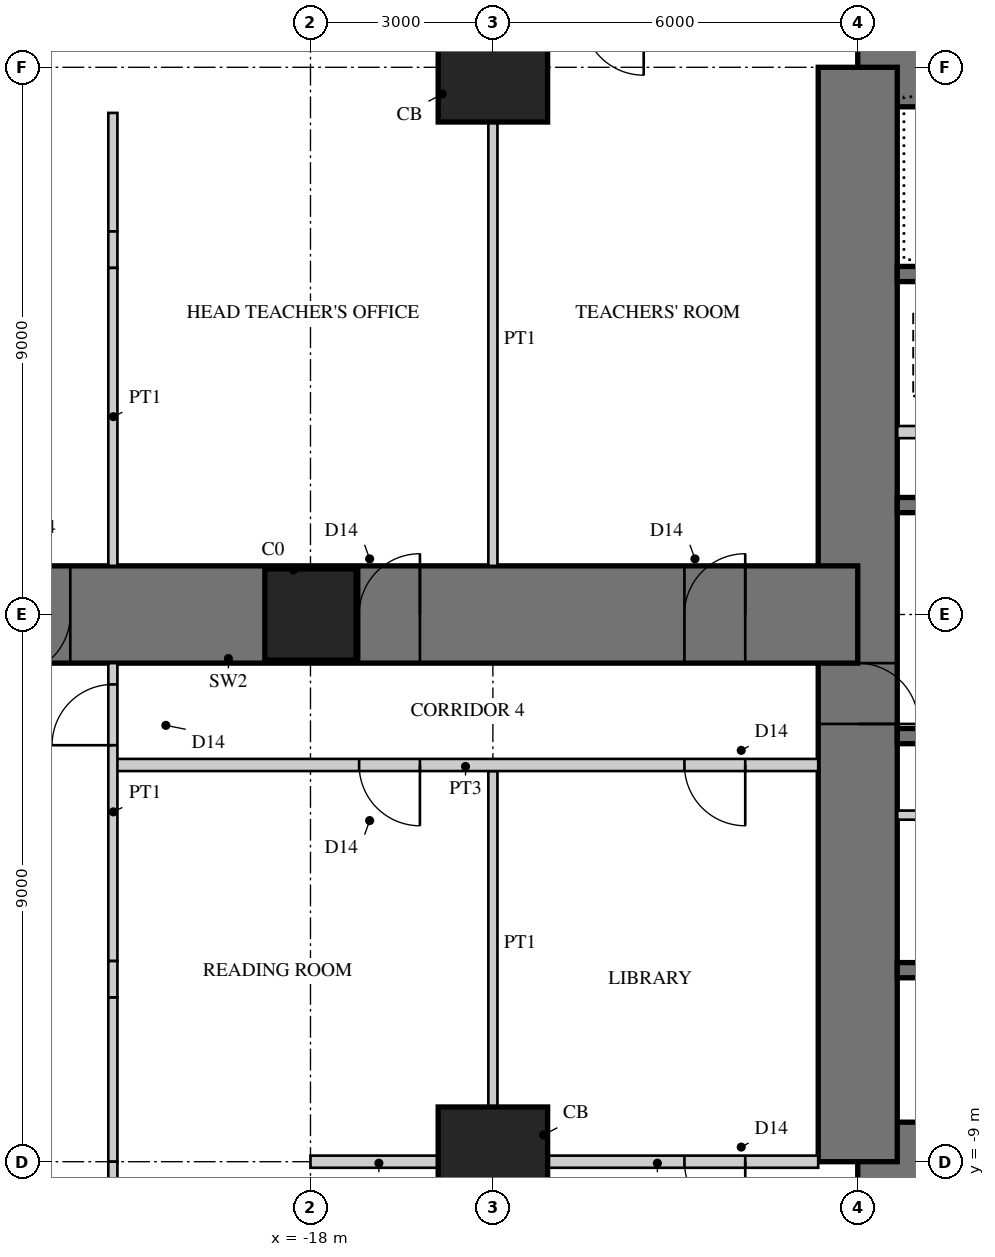
"""IFC4 building model, lengths in metres.
Left out: names, types, materials, properties, quantities, classifications, styles, units other than length and angle.
Written with IfcOpenShell. Run it as: python <this file> out.ifc"""

import sys

from ifc_helpers import new_model, si_unit, direction, frame, frame_2d, origin, origin_2d, place, context, subcontext, project, spatial, rectangle, extrude, element, fill, save


model = new_model("IFC4")
c1 = context("Model", 3, precision=1e-05, world=origin(), true_north=direction((0.0, 1.0)))
c2 = subcontext(c1, "Body", "Model", "MODEL_VIEW")
j1 = project(units=[si_unit("LENGTHUNIT", "METRE"), si_unit("PLANEANGLEUNIT", "RADIAN")], contexts=[c1])
p1 = place(None, origin())
s1 = spatial("IfcSite", under=j1, at=p1, CompositionType="ELEMENT")
p2 = place(p1, origin())
s2 = spatial("IfcBuilding", under=s1, at=p2, CompositionType="ELEMENT")
p3 = place(p2, frame((0.0, 0.0, 5.0)))
s3 = spatial("IfcBuildingStorey", under=s2, at=p3, CompositionType="ELEMENT", Elevation=5.0)
p4 = place(p3, frame((9.0, 9.0, 0.0), z_axis=(0.0, 0.0, 1.0), x_axis=(-1.0, 0.0, 0.0)))
e1 = element("IfcWall", 1, at=p4, inside=s3, PredefinedType="SHEAR", context=c2, shape_type="SweptSolid", body=[
    extrude(rectangle(XDim=18.0, YDim=1.3, at=frame_2d((9.0, 0.0))), origin(), (0.0, 0.0, 1.0), 4.5),
])
p5 = place(p4, frame((9.8, 0.0, 0.0)))
e2 = element("IfcOpeningElement", 2, at=p5, cuts=e1, PredefinedType="OPENING", context=c2, shape_type="SweptSolid", body=[
    extrude(rectangle(XDim=1.0, YDim=2.4, at=frame_2d((0.5, 1.2))), frame((0.0, 0.66, 0.0), z_axis=(0.0, -1.0, 0.0), x_axis=(1.0, 0.0, 0.0)), (0.0, 0.0, 1.0), 1.32),
])
p6 = place(p3, frame((-9.0, -9.0, 0.0), z_axis=(0.0, 0.0, 1.0), x_axis=(1.0, 0.0, 0.0)))
e3 = element("IfcWall", 3, at=p6, inside=s3, PredefinedType="SHEAR", context=c2, shape_type="SweptSolid", body=[
    extrude(rectangle(XDim=18.0, YDim=1.3, at=frame_2d((9.0, 0.0))), origin(), (0.0, 0.0, 1.0), 4.5),
])
p7 = place(p6, frame((9.8, 0.0, 0.0)))
e4 = element("IfcOpeningElement", 4, at=p7, cuts=e3, PredefinedType="OPENING", context=c2, shape_type="SweptSolid", body=[
    extrude(rectangle(XDim=1.0, YDim=2.4, at=frame_2d((0.5, 1.2))), frame((0.0, 0.66, 0.0), z_axis=(0.0, -1.0, 0.0), x_axis=(1.0, 0.0, 0.0)), (0.0, 0.0, 1.0), 1.32),
])
p8 = place(p3, frame((-9.0, 9.0, 0.0), z_axis=(0.0, 0.0, 1.0), x_axis=(0.0, -1.0, 0.0)))
e5 = element("IfcWall", 5, at=p8, inside=s3, PredefinedType="SHEAR", context=c2, shape_type="SweptSolid", body=[
    extrude(rectangle(XDim=18.0, YDim=1.3, at=frame_2d((9.0, 0.0))), origin(), (0.0, 0.0, 1.0), 4.5),
])
p9 = place(p8, frame((9.8, 0.0, 0.0)))
e6 = element("IfcOpeningElement", 6, at=p9, cuts=e5, PredefinedType="OPENING", context=c2, shape_type="SweptSolid", body=[
    extrude(rectangle(XDim=1.0, YDim=2.4, at=frame_2d((0.5, 1.2))), frame((0.0, 0.66, 0.0), z_axis=(0.0, -1.0, 0.0), x_axis=(1.0, 0.0, 0.0)), (0.0, 0.0, 1.0), 1.32),
])
p10 = place(p3, frame((-2.125, 1.8, 0.0), z_axis=(0.0, 0.0, 1.0), x_axis=(-1.0, 0.0, 0.0)))
e7 = element("IfcWall", 7, at=p10, inside=s3, PredefinedType="SHEAR", context=c2, shape_type="SweptSolid", body=[
    extrude(rectangle(XDim=6.225, YDim=0.25, at=frame_2d((3.113, 0.0))), origin(), (0.0, 0.0, 1.0), 4.5),
])
p11 = place(p3, frame((-2.125, 5.6, 0.0), z_axis=(0.0, 0.0, 1.0), x_axis=(-1.0, 0.0, 0.0)))
e8 = element("IfcWall", 8, at=p11, inside=s3, PredefinedType="SHEAR", context=c2, shape_type="SweptSolid", body=[
    extrude(rectangle(XDim=6.225, YDim=0.25, at=frame_2d((3.113, 0.0))), origin(), (0.0, 0.0, 1.0), 4.5),
])
p12 = place(p11, frame((0.175, 0.0, 0.0)))
e9 = element("IfcOpeningElement", 9, at=p12, cuts=e8, PredefinedType="OPENING", context=c2, shape_type="SweptSolid", body=[
    extrude(rectangle(XDim=1.0, YDim=2.1, at=frame_2d((0.5, 1.05))), frame((0.0, 0.135, 0.0), z_axis=(0.0, -1.0, 0.0), x_axis=(1.0, 0.0, 0.0)), (0.0, 0.0, 1.0), 0.27),
])
p13 = place(p3, frame((-5.725, 3.0, 0.0), z_axis=(0.0, 0.0, 1.0), x_axis=(-1.0, 0.0, 0.0)))
e10 = element("IfcWall", 10, at=p13, inside=s3, PredefinedType="PARTITIONING", context=c2, shape_type="SweptSolid", body=[
    extrude(rectangle(XDim=2.625, YDim=0.2, at=frame_2d((1.312, 0.0))), origin(), (0.0, 0.0, 1.0), 4.5),
])
for number, where, z_axis, x_axis in (
    (11, (-1.925, -2.0, 0.0), (0.0, 0.0, 1.0), (-1.0, 0.0, 0.0)),
    (12, (-1.925, -5.85, 0.0), (0.0, 0.0, 1.0), (-1.0, 0.0, 0.0)),
):
    element("IfcWall", number, at=place(p3, frame(where, z_axis=z_axis, x_axis=x_axis)), inside=s3, PredefinedType="SHEAR", context=c2, shape_type="SweptSolid", body=[
        extrude(rectangle(XDim=6.425, YDim=0.25, at=frame_2d((3.212, 0.0))), origin(), (0.0, 0.0, 1.0), 4.5),
    ])
p14 = place(p3, frame((-1.925, -3.3, 0.0), z_axis=(0.0, 0.0, 1.0), x_axis=(-1.0, 0.0, 0.0)))
e13 = element("IfcWall", 13, at=p14, inside=s3, PredefinedType="PARTITIONING", context=c2, shape_type="SweptSolid", body=[
    extrude(rectangle(XDim=6.425, YDim=0.15, at=frame_2d((3.212, 0.0))), origin(), (0.0, 0.0, 1.0), 4.5),
])
p15 = place(p14, frame((0.075, 0.0, 0.0)))
e14 = element("IfcOpeningElement", 14, at=p15, cuts=e13, PredefinedType="OPENING", context=c2, shape_type="SweptSolid", body=[
    extrude(rectangle(XDim=0.8, YDim=2.1, at=frame_2d((0.4, 1.05))), frame((0.0, 0.085, 0.0), z_axis=(0.0, -1.0, 0.0), x_axis=(1.0, 0.0, 0.0)), (0.0, 0.0, 1.0), 0.17),
])
p16 = place(p14, frame((3.675, 0.0, 0.0)))
e15 = element("IfcOpeningElement", 15, at=p16, cuts=e13, PredefinedType="OPENING", context=c2, shape_type="SweptSolid", body=[
    extrude(rectangle(XDim=0.8, YDim=2.1, at=frame_2d((0.4, 1.05))), frame((0.0, 0.085, 0.0), z_axis=(0.0, -1.0, 0.0), x_axis=(1.0, 0.0, 0.0)), (0.0, 0.0, 1.0), 0.17),
])
p17 = place(p3, frame((-9.0, 0.0, 0.0), z_axis=(0.0, 0.0, 1.0), x_axis=(-1.0, 0.0, 0.0)))
e16 = element("IfcWall", 16, at=p17, inside=s3, PredefinedType="SHEAR", context=c2, shape_type="SweptSolid", body=[
    extrude(rectangle(XDim=18.0, YDim=1.6, at=frame_2d((9.0, 0.0))), origin(), (0.0, 0.0, 1.0), 4.5),
])
p18 = place(p17, frame((1.85, 0.0, 0.0)))
e17 = element("IfcOpeningElement", 17, at=p18, cuts=e16, PredefinedType="OPENING", context=c2, shape_type="SweptSolid", body=[
    extrude(rectangle(XDim=1.0, YDim=2.2, at=frame_2d((0.5, 1.1))), frame((0.0, 0.81, 0.0), z_axis=(0.0, -1.0, 0.0), x_axis=(1.0, 0.0, 0.0)), (0.0, 0.0, 1.0), 1.62),
])
p19 = place(p17, frame((7.2, 0.0, 0.0)))
e18 = element("IfcOpeningElement", 18, at=p19, cuts=e16, PredefinedType="OPENING", context=c2, shape_type="SweptSolid", body=[
    extrude(rectangle(XDim=1.0, YDim=2.2, at=frame_2d((0.5, 1.1))), frame((0.0, 0.81, 0.0), z_axis=(0.0, -1.0, 0.0), x_axis=(1.0, 0.0, 0.0)), (0.0, 0.0, 1.0), 1.62),
])
p20 = place(p17, frame((12.95, 0.0, 0.0)))
e19 = element("IfcOpeningElement", 19, at=p20, cuts=e16, PredefinedType="OPENING", context=c2, shape_type="SweptSolid", body=[
    extrude(rectangle(XDim=1.0, YDim=2.2, at=frame_2d((0.5, 1.1))), frame((0.0, 0.81, 0.0), z_axis=(0.0, -1.0, 0.0), x_axis=(1.0, 0.0, 0.0)), (0.0, 0.0, 1.0), 1.62),
])
for number, where, z_axis, x_axis in (
    (20, (-15.0, 9.0, 0.0), (0.0, 0.0, 1.0), (1.0, 0.0, 0.0)),
    (21, (-15.0, -9.0, 0.0), (0.0, 0.0, 1.0), (1.0, 0.0, 0.0)),
):
    element("IfcColumn", number, at=place(p3, frame(where, z_axis=z_axis, x_axis=x_axis)), inside=s3, PredefinedType="COLUMN", context=c2, shape_type="SweptSolid", body=[
        extrude(rectangle(XDim=1.8, YDim=1.8, at=origin_2d()), origin(), (0.0, 0.0, 1.0), 4.5),
    ])
p21 = place(p3, frame((-18.0, 0.0, 0.0), z_axis=(0.0, 0.0, 1.0), x_axis=(1.0, 0.0, 0.0)))
e22 = element("IfcColumn", 22, at=p21, inside=s3, PredefinedType="COLUMN", context=c2, shape_type="SweptSolid", body=[
    extrude(rectangle(XDim=1.5, YDim=1.5, at=origin_2d()), origin(), (0.0, 0.0, 1.0), 4.5),
])
p22 = place(p3, frame((-15.0, -2.575, 0.0), z_axis=(0.0, 0.0, 1.0), x_axis=(0.0, -1.0, 0.0)))
e23 = element("IfcWall", 23, at=p22, inside=s3, PredefinedType="PARTITIONING", context=c2, shape_type="SweptSolid", body=[
    extrude(rectangle(XDim=5.675, YDim=0.15, at=frame_2d((2.837, 0.0))), origin(), (0.0, 0.0, 1.0), 3.35),
])
p23 = place(p3, frame((-15.0, 8.25, 0.0), z_axis=(0.0, 0.0, 1.0), x_axis=(0.0, -1.0, 0.0)))
e24 = element("IfcWall", 24, at=p23, inside=s3, PredefinedType="PARTITIONING", context=c2, shape_type="SweptSolid", body=[
    extrude(rectangle(XDim=7.45, YDim=0.15, at=frame_2d((3.725, 0.0))), origin(), (0.0, 0.0, 1.0), 3.35),
])
p24 = place(p3, frame((-9.65, -2.475, 0.0), z_axis=(0.0, 0.0, 1.0), x_axis=(-1.0, 0.0, 0.0)))
e25 = element("IfcWall", 25, at=p24, inside=s3, PredefinedType="SOLIDWALL", context=c2, shape_type="SweptSolid", body=[
    extrude(rectangle(XDim=11.6, YDim=0.2, at=frame_2d((5.8, 0.0))), origin(), (0.0, 0.0, 1.0), 4.3),
])
p25 = place(p24, frame((1.2, 0.0, 0.0)))
e26 = element("IfcOpeningElement", 26, at=p25, cuts=e25, PredefinedType="OPENING", context=c2, shape_type="SweptSolid", body=[
    extrude(rectangle(XDim=1.0, YDim=2.2, at=frame_2d((0.5, 1.1))), frame((0.0, 0.11, 0.0), z_axis=(0.0, -1.0, 0.0), x_axis=(1.0, 0.0, 0.0)), (0.0, 0.0, 1.0), 0.22),
])
p26 = place(p24, frame((6.55, 0.0, 0.0)))
e27 = element("IfcOpeningElement", 27, at=p26, cuts=e25, PredefinedType="OPENING", context=c2, shape_type="SweptSolid", body=[
    extrude(rectangle(XDim=1.0, YDim=2.2, at=frame_2d((0.5, 1.1))), frame((0.0, 0.11, 0.0), z_axis=(0.0, -1.0, 0.0), x_axis=(1.0, 0.0, 0.0)), (0.0, 0.0, 1.0), 0.22),
])
p27 = place(p3, frame((-21.25, 8.25, 0.0), z_axis=(0.0, 0.0, 1.0), x_axis=(0.0, -1.0, 0.0)))
e28 = element("IfcWall", 28, at=p27, inside=s3, PredefinedType="PARTITIONING", context=c2, shape_type="SweptSolid", body=[
    extrude(rectangle(XDim=1.95, YDim=0.15, at=frame_2d((0.975, 0.0))), origin(), (0.0, 0.0, 1.0), 3.35),
])
p28 = place(p3, frame((-21.25, 6.3, 0.0), z_axis=(0.0, 0.0, 1.0), x_axis=(0.0, -1.0, 0.0)))
e29 = element("IfcWall", 29, at=p28, inside=s3, PredefinedType="PARTITIONING", context=c2, shape_type="SweptSolid", body=[
    extrude(rectangle(XDim=0.6, YDim=0.15, at=frame_2d((0.3, 0.0))), origin(), (0.0, 0.0, 1.0), 4.3),
])
p29 = place(p3, frame((-21.25, 5.7, 0.0), z_axis=(0.0, 0.0, 1.0), x_axis=(0.0, -1.0, 0.0)))
e30 = element("IfcWall", 30, at=p29, inside=s3, PredefinedType="PARTITIONING", context=c2, shape_type="SweptSolid", body=[
    extrude(rectangle(XDim=4.9, YDim=0.15, at=frame_2d((2.45, 0.0))), origin(), (0.0, 0.0, 1.0), 3.35),
])
p30 = place(p3, frame((-21.25, -0.8, 0.0), z_axis=(0.0, 0.0, 1.0), x_axis=(0.0, -1.0, 0.0)))
e31 = element("IfcWall", 31, at=p30, inside=s3, PredefinedType="PARTITIONING", context=c2, shape_type="SweptSolid", body=[
    extrude(rectangle(XDim=4.9, YDim=0.15, at=frame_2d((2.45, 0.0))), origin(), (0.0, 0.0, 1.0), 3.35),
])
p31 = place(p30, frame((0.35, 0.0, 0.0)))
e32 = element("IfcOpeningElement", 32, at=p31, cuts=e31, PredefinedType="OPENING", context=c2, shape_type="SweptSolid", body=[
    extrude(rectangle(XDim=1.0, YDim=2.2, at=frame_2d((0.5, 1.1))), frame((0.0, 0.085, 0.0), z_axis=(0.0, -1.0, 0.0), x_axis=(1.0, 0.0, 0.0)), (0.0, 0.0, 1.0), 0.17),
])
p32 = place(p3, frame((-21.25, -5.7, 0.0), z_axis=(0.0, 0.0, 1.0), x_axis=(0.0, -1.0, 0.0)))
e33 = element("IfcWall", 33, at=p32, inside=s3, PredefinedType="PARTITIONING", context=c2, shape_type="SweptSolid", body=[
    extrude(rectangle(XDim=0.6, YDim=0.15, at=frame_2d((0.3, 0.0))), origin(), (0.0, 0.0, 1.0), 4.3),
])
p33 = place(p3, frame((-21.25, -6.3, 0.0), z_axis=(0.0, 0.0, 1.0), x_axis=(0.0, -1.0, 0.0)))
e34 = element("IfcWall", 34, at=p33, inside=s3, PredefinedType="PARTITIONING", context=c2, shape_type="SweptSolid", body=[
    extrude(rectangle(XDim=2.7, YDim=0.15, at=frame_2d((1.35, 0.0))), origin(), (0.0, 0.0, 1.0), 3.35),
])
p34 = place(p3, frame((-21.25, -9.0, 0.0), z_axis=(0.0, 0.0, 1.0), x_axis=(0.0, -1.0, 0.0)))
e35 = element("IfcWall", 35, at=p34, inside=s3, PredefinedType="PARTITIONING", context=c2, shape_type="SweptSolid", body=[
    extrude(rectangle(XDim=0.72, YDim=0.15, at=frame_2d((0.36, 0.0))), origin(), (0.0, 0.0, 1.0), 4.3),
])
p35 = place(p3, frame((-9.65, -9.0, 0.0), z_axis=(0.0, 0.0, 1.0), x_axis=(-1.0, 0.0, 0.0)))
e36 = element("IfcWall", 36, at=p35, inside=s3, PredefinedType="SOLIDWALL", context=c2, shape_type="SweptSolid", body=[
    extrude(rectangle(XDim=4.6, YDim=0.2, at=frame_2d((2.3, 0.0))), origin(), (0.0, 0.0, 1.0), 3.3),
])
p36 = place(p35, frame((1.2, 0.0, 0.0)))
e37 = element("IfcOpeningElement", 37, at=p36, cuts=e36, PredefinedType="OPENING", context=c2, shape_type="SweptSolid", body=[
    extrude(rectangle(XDim=1.0, YDim=2.2, at=frame_2d((0.5, 1.1))), frame((0.0, 0.11, 0.0), z_axis=(0.0, -1.0, 0.0), x_axis=(1.0, 0.0, 0.0)), (0.0, 0.0, 1.0), 0.22),
])
p37 = place(p3, frame((-15.75, -9.0, 0.0), z_axis=(0.0, 0.0, 1.0), x_axis=(-1.0, 0.0, 0.0)))
e38 = element("IfcWall", 38, at=p37, inside=s3, PredefinedType="SOLIDWALL", context=c2, shape_type="SweptSolid", body=[
    extrude(rectangle(XDim=2.25, YDim=0.2, at=frame_2d((1.125, 0.0))), origin(), (0.0, 0.0, 1.0), 3.3),
])
p38 = place(p25, origin())
e39 = element("IfcDoor", 39, at=p38, inside=s3, OperationType="SINGLE_SWING_LEFT", PredefinedType="DOOR", context=c2, shape_type="SweptSolid", body=[
    extrude(rectangle(XDim=1.0, YDim=2.2, at=frame_2d((0.5, 1.1))), frame((0.0, 0.025, 0.0), z_axis=(0.0, -1.0, 0.0), x_axis=(1.0, 0.0, 0.0)), (0.0, 0.0, 1.0), 0.05),
])
fill(e26, e39)
p39 = place(p26, origin())
e40 = element("IfcDoor", 40, at=p39, inside=s3, OperationType="SINGLE_SWING_LEFT", PredefinedType="DOOR", context=c2, shape_type="SweptSolid", body=[
    extrude(rectangle(XDim=1.0, YDim=2.2, at=frame_2d((0.5, 1.1))), frame((0.0, 0.025, 0.0), z_axis=(0.0, -1.0, 0.0), x_axis=(1.0, 0.0, 0.0)), (0.0, 0.0, 1.0), 0.05),
])
fill(e27, e40)
p40 = place(p31, frame((1.0, 0.0, 0.0), z_axis=(0.0, 0.0, 1.0), x_axis=(-1.0, 0.0, 0.0)))
e41 = element("IfcDoor", 41, at=p40, inside=s3, OperationType="SINGLE_SWING_LEFT", PredefinedType="DOOR", context=c2, shape_type="SweptSolid", body=[
    extrude(rectangle(XDim=1.0, YDim=2.2, at=frame_2d((0.5, 1.1))), frame((0.0, 0.025, 0.0), z_axis=(0.0, -1.0, 0.0), x_axis=(1.0, 0.0, 0.0)), (0.0, 0.0, 1.0), 0.05),
])
fill(e32, e41)
p41 = place(p36, origin())
e42 = element("IfcDoor", 42, at=p41, inside=s3, OperationType="SINGLE_SWING_LEFT", PredefinedType="DOOR", context=c2, shape_type="SweptSolid", body=[
    extrude(rectangle(XDim=1.0, YDim=2.2, at=frame_2d((0.5, 1.1))), frame((0.0, 0.025, 0.0), z_axis=(0.0, -1.0, 0.0), x_axis=(1.0, 0.0, 0.0)), (0.0, 0.0, 1.0), 0.05),
])
fill(e37, e42)
p42 = place(p18, frame((1.0, 0.0, 0.0), z_axis=(0.0, 0.0, 1.0), x_axis=(-1.0, 0.0, 0.0)))
e43 = element("IfcDoor", 43, at=p42, inside=s3, OperationType="SINGLE_SWING_RIGHT", PredefinedType="DOOR", context=c2, shape_type="SweptSolid", body=[
    extrude(rectangle(XDim=1.0, YDim=2.2, at=frame_2d((0.5, 1.1))), frame((0.0, 0.025, 0.0), z_axis=(0.0, -1.0, 0.0), x_axis=(1.0, 0.0, 0.0)), (0.0, 0.0, 1.0), 0.05),
])
fill(e17, e43)
p43 = place(p19, frame((1.0, 0.0, 0.0), z_axis=(0.0, 0.0, 1.0), x_axis=(-1.0, 0.0, 0.0)))
e44 = element("IfcDoor", 44, at=p43, inside=s3, OperationType="SINGLE_SWING_RIGHT", PredefinedType="DOOR", context=c2, shape_type="SweptSolid", body=[
    extrude(rectangle(XDim=1.0, YDim=2.2, at=frame_2d((0.5, 1.1))), frame((0.0, 0.025, 0.0), z_axis=(0.0, -1.0, 0.0), x_axis=(1.0, 0.0, 0.0)), (0.0, 0.0, 1.0), 0.05),
])
fill(e18, e44)
p44 = place(p20, origin())
e45 = element("IfcDoor", 45, at=p44, inside=s3, OperationType="SINGLE_SWING_RIGHT", PredefinedType="DOOR", context=c2, shape_type="SweptSolid", body=[
    extrude(rectangle(XDim=1.0, YDim=2.2, at=frame_2d((0.5, 1.1))), frame((0.0, 0.025, 0.0), z_axis=(0.0, -1.0, 0.0), x_axis=(1.0, 0.0, 0.0)), (0.0, 0.0, 1.0), 0.05),
])
fill(e19, e45)
p45 = place(p9, origin())
e46 = element("IfcDoor", 46, at=p45, inside=s3, OperationType="SINGLE_SWING_RIGHT", PredefinedType="DOOR", context=c2, shape_type="SweptSolid", body=[
    extrude(rectangle(XDim=1.0, YDim=2.4, at=frame_2d((0.5, 1.2))), frame((0.0, 0.055, 0.0), z_axis=(0.0, -1.0, 0.0), x_axis=(1.0, 0.0, 0.0)), (0.0, 0.0, 1.0), 0.05),
])
fill(e6, e46)
save(model, sys.argv[1])
